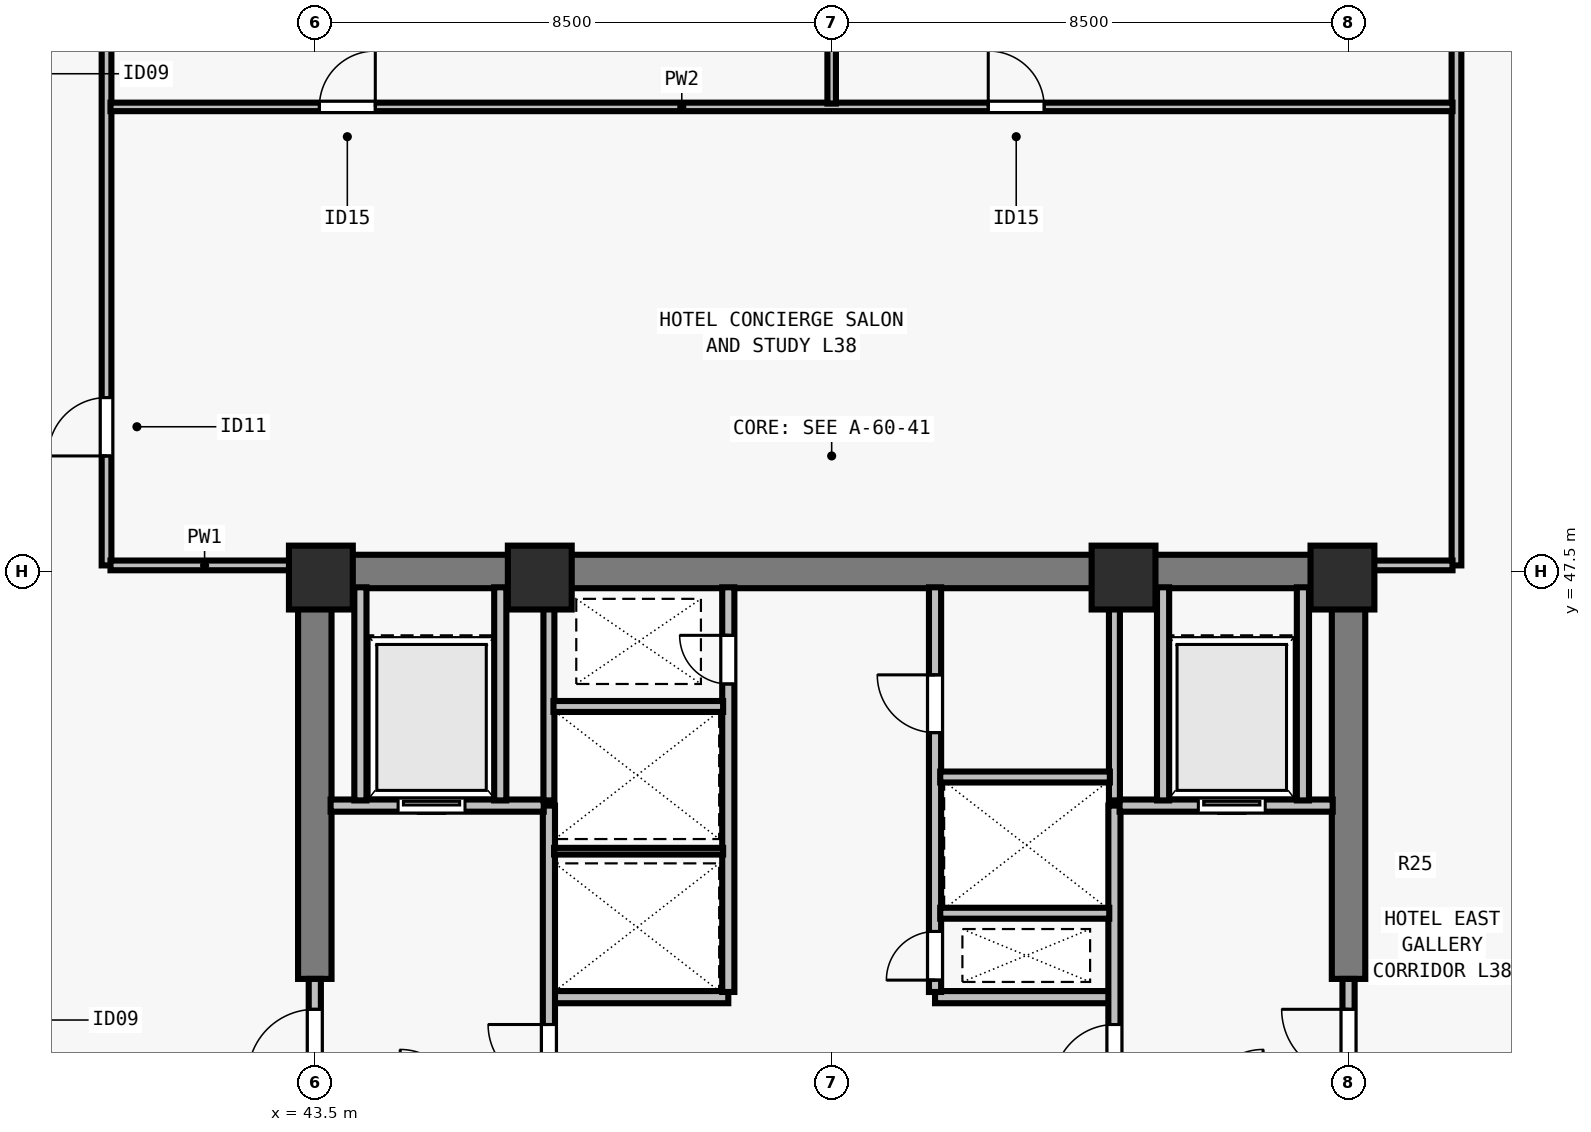
"""IFC4 building model, lengths in metres.
Left out: names, types, materials, properties, quantities, classifications, styles, units other than length and angle.
Written with IfcOpenShell. Run it as: python <this file> out.ifc"""

import sys

from ifc_helpers import new_model, si_unit, direction, frame, frame_2d, origin, origin_2d, place, context, subcontext, project, spatial, rectangle, extrude, element, fill, save


model = new_model("IFC4")
c1 = context("Model", 3, precision=1e-05, world=origin(), true_north=direction((0.0, 1.0)))
c2 = subcontext(c1, "Body", "Model", "MODEL_VIEW")
j1 = project(units=[si_unit("LENGTHUNIT", "METRE"), si_unit("PLANEANGLEUNIT", "RADIAN")], contexts=[c1])
p1 = place(None, origin())
s1 = spatial("IfcSite", under=j1, at=p1, CompositionType="ELEMENT")
p2 = place(p1, origin())
s2 = spatial("IfcBuilding", under=s1, at=p2, CompositionType="ELEMENT")
p3 = place(p2, frame((0.0, 0.0, 141.0)))
s3 = spatial("IfcBuildingStorey", under=s2, at=p3, CompositionType="ELEMENT", Elevation=141.0)
for number, where, z_axis, x_axis in (
    (1, (43.6, 47.4, 0.0), (0.0, 0.0, 1.0), (1.0, 0.0, 0.0)),
    (2, (47.2, 47.4, 0.0), (0.0, 0.0, 1.0), (1.0, 0.0, 0.0)),
    (3, (56.8, 47.4, 0.0), (0.0, 0.0, 1.0), (1.0, 0.0, 0.0)),
    (4, (60.4, 47.4, 0.0), (0.0, 0.0, 1.0), (1.0, 0.0, 0.0)),
):
    element("IfcColumn", number, at=place(p3, frame(where, z_axis=z_axis, x_axis=x_axis)), inside=s3, PredefinedType="COLUMN", context=c2, shape_type="SweptSolid", body=[
        extrude(rectangle(XDim=1.05, YDim=1.05, at=origin_2d()), origin(), (0.0, 0.0, 1.0), 3.5),
    ])
p4 = place(p3, frame((43.225, 47.5, 0.0), z_axis=(0.0, 0.0, 1.0), x_axis=(1.0, 0.0, 0.0)))
e5 = element("IfcWall", 5, at=p4, inside=s3, PredefinedType="SHEAR", context=c2, shape_type="SweptSolid", body=[
    extrude(rectangle(XDim=17.55, YDim=0.55, at=frame_2d((8.775, 0.0))), origin(), (0.0, 0.0, 1.0), 3.28),
])
for number, where, z_axis, x_axis in (
    (6, (43.5, 40.8, 0.0), (0.0, 0.0, 1.0), (0.0, 1.0, 0.0)),
    (7, (60.5, 40.8, 0.0), (0.0, 0.0, 1.0), (0.0, 1.0, 0.0)),
):
    element("IfcWall", number, at=place(p3, frame(where, z_axis=z_axis, x_axis=x_axis)), inside=s3, PredefinedType="SHEAR", context=c2, shape_type="SweptSolid", body=[
        extrude(rectangle(XDim=6.435, YDim=0.55, at=frame_2d((3.218, 0.0))), origin(), (0.0, 0.0, 1.0), 3.28),
    ])
for number, where, z_axis, x_axis in (
    (8, (47.35, 40.5, 0.0), (0.0, 0.0, 1.0), (1.0, 0.0, 0.0)),
    (9, (53.7, 40.5, 0.0), (0.0, 0.0, 1.0), (1.0, 0.0, 0.0)),
):
    element("IfcWall", number, at=place(p3, frame(where, z_axis=z_axis, x_axis=x_axis)), inside=s3, PredefinedType="SOLIDWALL", context=c2, shape_type="SweptSolid", body=[
        extrude(rectangle(XDim=2.95, YDim=0.2, at=frame_2d((1.475, 0.0))), origin(), (0.0, 0.0, 1.0), 3.28),
    ])
p5 = place(p3, frame((50.3, 40.585, 0.0), z_axis=(0.0, 0.0, 1.0), x_axis=(0.0, 1.0, 0.0)))
e10 = element("IfcWall", 10, at=p5, inside=s3, PredefinedType="SOLIDWALL", context=c2, shape_type="SweptSolid", body=[
    extrude(rectangle(XDim=6.655, YDim=0.2, at=frame_2d((3.328, 0.0))), origin(), (0.0, 0.0, 1.0), 3.28),
])
p6 = place(p5, frame((5.065, 0.0, 0.0)))
e11 = element("IfcOpeningElement", 11, at=p6, cuts=e10, PredefinedType="OPENING", context=c2, shape_type="SweptSolid", body=[
    extrude(rectangle(XDim=0.8, YDim=2.08, at=frame_2d((0.4, 1.04))), frame((0.0, 0.11, 0.0), z_axis=(0.0, -1.0, 0.0), x_axis=(1.0, 0.0, 0.0)), (0.0, 0.0, 1.0), 0.22),
])
p7 = place(p3, frame((53.7, 40.585, 0.0), z_axis=(0.0, 0.0, 1.0), x_axis=(0.0, 1.0, 0.0)))
e12 = element("IfcWall", 12, at=p7, inside=s3, PredefinedType="SOLIDWALL", context=c2, shape_type="SweptSolid", body=[
    extrude(rectangle(XDim=6.655, YDim=0.2, at=frame_2d((3.328, 0.0))), origin(), (0.0, 0.0, 1.0), 3.28),
])
p8 = place(p7, frame((0.195, 0.0, 0.0)))
e13 = element("IfcOpeningElement", 13, at=p8, cuts=e12, PredefinedType="OPENING", context=c2, shape_type="SweptSolid", body=[
    extrude(rectangle(XDim=0.8, YDim=2.08, at=frame_2d((0.4, 1.04))), frame((0.0, 0.11, 0.0), z_axis=(0.0, -1.0, 0.0), x_axis=(1.0, 0.0, 0.0)), (0.0, 0.0, 1.0), 0.22),
])
p9 = place(p7, frame((4.265, 0.0, 0.0)))
e14 = element("IfcOpeningElement", 14, at=p9, cuts=e12, PredefinedType="OPENING", context=c2, shape_type="SweptSolid", body=[
    extrude(rectangle(XDim=0.95, YDim=2.12, at=frame_2d((0.475, 1.06))), frame((0.0, 0.11, 0.0), z_axis=(0.0, -1.0, 0.0), x_axis=(1.0, 0.0, 0.0)), (0.0, 0.0, 1.0), 0.22),
])
p10 = place(p3, frame((43.5, 38.75, 0.0), z_axis=(0.0, 0.0, 1.0), x_axis=(0.0, 1.0, 0.0)))
e15 = element("IfcWall", 15, at=p10, inside=s3, PredefinedType="SOLIDWALL", context=c2, shape_type="SweptSolid", body=[
    extrude(rectangle(XDim=2.05, YDim=0.2, at=frame_2d((1.025, 0.0))), origin(), (0.0, 0.0, 1.0), 3.28),
])
p11 = place(p10, frame((0.45, 0.0, 0.0)))
e16 = element("IfcOpeningElement", 16, at=p11, cuts=e15, PredefinedType="OPENING", context=c2, shape_type="SweptSolid", body=[
    extrude(rectangle(XDim=1.1, YDim=2.15, at=frame_2d((0.55, 1.075))), frame((0.0, 0.11, 0.0), z_axis=(0.0, -1.0, 0.0), x_axis=(1.0, 0.0, 0.0)), (0.0, 0.0, 1.0), 0.22),
])
p12 = place(p3, frame((47.35, 38.785, 0.0), z_axis=(0.0, 0.0, 1.0), x_axis=(0.0, 1.0, 0.0)))
e17 = element("IfcWall", 17, at=p12, inside=s3, PredefinedType="SOLIDWALL", context=c2, shape_type="SweptSolid", body=[
    extrude(rectangle(XDim=4.865, YDim=0.2, at=frame_2d((2.433, 0.0))), origin(), (0.0, 0.0, 1.0), 3.28),
])
p13 = place(p12, frame((0.265, 0.0, 0.0)))
e18 = element("IfcOpeningElement", 18, at=p13, cuts=e17, PredefinedType="OPENING", context=c2, shape_type="SweptSolid", body=[
    extrude(rectangle(XDim=1.0, YDim=2.15, at=frame_2d((0.5, 1.075))), frame((0.0, 0.11, 0.0), z_axis=(0.0, -1.0, 0.0), x_axis=(1.0, 0.0, 0.0)), (0.0, 0.0, 1.0), 0.22),
])
p14 = place(p3, frame((43.76, 43.65, 0.0), z_axis=(0.0, 0.0, 1.0), x_axis=(1.0, 0.0, 0.0)))
e19 = element("IfcWall", 19, at=p14, inside=s3, PredefinedType="SOLIDWALL", context=c2, shape_type="SweptSolid", body=[
    extrude(rectangle(XDim=3.505, YDim=0.2, at=frame_2d((1.752, 0.0))), origin(), (0.0, 0.0, 1.0), 3.28),
])
p15 = place(p14, frame((1.11, 0.0, 0.0)))
e20 = element("IfcOpeningElement", 20, at=p15, cuts=e19, PredefinedType="OPENING", context=c2, shape_type="SweptSolid", body=[
    extrude(rectangle(XDim=1.1, YDim=2.2, at=frame_2d((0.55, 1.1))), frame((0.0, 0.11, 0.0), z_axis=(0.0, -1.0, 0.0), x_axis=(1.0, 0.0, 0.0)), (0.0, 0.0, 1.0), 0.22),
])
for number, where, z_axis, x_axis in (
    (21, (46.55, 43.735, 0.0), (0.0, 0.0, 1.0), (0.0, 1.0, 0.0)),
    (22, (44.25, 43.735, 0.0), (0.0, 0.0, 1.0), (0.0, 1.0, 0.0)),
):
    element("IfcWall", number, at=place(p3, frame(where, z_axis=z_axis, x_axis=x_axis)), inside=s3, PredefinedType="SOLIDWALL", context=c2, shape_type="SweptSolid", body=[
        extrude(rectangle(XDim=3.505, YDim=0.2, at=frame_2d((1.752, 0.0))), origin(), (0.0, 0.0, 1.0), 3.28),
    ])
p16 = place(p3, frame((60.5, 38.75, 0.0), z_axis=(0.0, 0.0, 1.0), x_axis=(0.0, 1.0, 0.0)))
e23 = element("IfcWall", 23, at=p16, inside=s3, PredefinedType="SOLIDWALL", context=c2, shape_type="SweptSolid", body=[
    extrude(rectangle(XDim=2.05, YDim=0.2, at=frame_2d((1.025, 0.0))), origin(), (0.0, 0.0, 1.0), 3.28),
])
p17 = place(p16, frame((0.45, 0.0, 0.0)))
e24 = element("IfcOpeningElement", 24, at=p17, cuts=e23, PredefinedType="OPENING", context=c2, shape_type="SweptSolid", body=[
    extrude(rectangle(XDim=1.1, YDim=2.15, at=frame_2d((0.55, 1.075))), frame((0.0, 0.11, 0.0), z_axis=(0.0, -1.0, 0.0), x_axis=(1.0, 0.0, 0.0)), (0.0, 0.0, 1.0), 0.22),
])
p18 = place(p3, frame((56.65, 38.785, 0.0), z_axis=(0.0, 0.0, 1.0), x_axis=(0.0, 1.0, 0.0)))
e25 = element("IfcWall", 25, at=p18, inside=s3, PredefinedType="SOLIDWALL", context=c2, shape_type="SweptSolid", body=[
    extrude(rectangle(XDim=4.865, YDim=0.2, at=frame_2d((2.433, 0.0))), origin(), (0.0, 0.0, 1.0), 3.28),
])
p19 = place(p18, frame((0.265, 0.0, 0.0)))
e26 = element("IfcOpeningElement", 26, at=p19, cuts=e25, PredefinedType="OPENING", context=c2, shape_type="SweptSolid", body=[
    extrude(rectangle(XDim=1.0, YDim=2.15, at=frame_2d((0.5, 1.075))), frame((0.0, 0.11, 0.0), z_axis=(0.0, -1.0, 0.0), x_axis=(1.0, 0.0, 0.0)), (0.0, 0.0, 1.0), 0.22),
])
p20 = place(p3, frame((56.735, 43.65, 0.0), z_axis=(0.0, 0.0, 1.0), x_axis=(1.0, 0.0, 0.0)))
e27 = element("IfcWall", 27, at=p20, inside=s3, PredefinedType="SOLIDWALL", context=c2, shape_type="SweptSolid", body=[
    extrude(rectangle(XDim=3.505, YDim=0.2, at=frame_2d((1.752, 0.0))), origin(), (0.0, 0.0, 1.0), 3.28),
])
p21 = place(p20, frame((1.295, 0.0, 0.0)))
e28 = element("IfcOpeningElement", 28, at=p21, cuts=e27, PredefinedType="OPENING", context=c2, shape_type="SweptSolid", body=[
    extrude(rectangle(XDim=1.1, YDim=2.2, at=frame_2d((0.55, 1.1))), frame((0.0, 0.11, 0.0), z_axis=(0.0, -1.0, 0.0), x_axis=(1.0, 0.0, 0.0)), (0.0, 0.0, 1.0), 0.22),
])
for number, where, z_axis, x_axis in (
    (29, (57.45, 43.735, 0.0), (0.0, 0.0, 1.0), (0.0, 1.0, 0.0)),
    (30, (59.75, 43.735, 0.0), (0.0, 0.0, 1.0), (0.0, 1.0, 0.0)),
):
    element("IfcWall", number, at=place(p3, frame(where, z_axis=z_axis, x_axis=x_axis)), inside=s3, PredefinedType="SOLIDWALL", context=c2, shape_type="SweptSolid", body=[
        extrude(rectangle(XDim=3.505, YDim=0.2, at=frame_2d((1.752, 0.0))), origin(), (0.0, 0.0, 1.0), 3.28),
    ])
p22 = place(p3, frame((47.35, 43.735, 0.0), z_axis=(0.0, 0.0, 1.0), x_axis=(0.0, 1.0, 0.0)))
e31 = element("IfcWall", 31, at=p22, inside=s3, PredefinedType="SOLIDWALL", context=c2, shape_type="SweptSolid", body=[
    extrude(rectangle(XDim=3.505, YDim=0.18, at=frame_2d((1.752, 0.0))), origin(), (0.0, 0.0, 1.0), 3.28),
])
p23 = place(p3, frame((47.435, 42.9, 0.0), z_axis=(0.0, 0.0, 1.0), x_axis=(1.0, 0.0, 0.0)))
e32 = element("IfcWall", 32, at=p23, inside=s3, PredefinedType="PARTITIONING", context=c2, shape_type="SweptSolid", body=[
    extrude(rectangle(XDim=2.78, YDim=0.11, at=frame_2d((1.39, 0.0))), origin(), (0.0, 0.0, 1.0), 3.28),
])
p24 = place(p3, frame((47.425, 45.28, 0.0), z_axis=(0.0, 0.0, 1.0), x_axis=(1.0, 0.0, 0.0)))
e33 = element("IfcWall", 33, at=p24, inside=s3, PredefinedType="SOLIDWALL", context=c2, shape_type="SweptSolid", body=[
    extrude(rectangle(XDim=2.79, YDim=0.18, at=frame_2d((1.395, 0.0))), origin(), (0.0, 0.0, 1.0), 3.28),
])
p25 = place(p3, frame((56.65, 43.735, 0.0), z_axis=(0.0, 0.0, 1.0), x_axis=(0.0, 1.0, 0.0)))
e34 = element("IfcWall", 34, at=p25, inside=s3, PredefinedType="SOLIDWALL", context=c2, shape_type="SweptSolid", body=[
    extrude(rectangle(XDim=3.505, YDim=0.18, at=frame_2d((1.752, 0.0))), origin(), (0.0, 0.0, 1.0), 3.28),
])
p26 = place(p3, frame((53.785, 41.88, 0.0), z_axis=(0.0, 0.0, 1.0), x_axis=(1.0, 0.0, 0.0)))
e35 = element("IfcWall", 35, at=p26, inside=s3, PredefinedType="SOLIDWALL", context=c2, shape_type="SweptSolid", body=[
    extrude(rectangle(XDim=2.78, YDim=0.18, at=frame_2d((1.39, 0.0))), origin(), (0.0, 0.0, 1.0), 3.28),
])
p27 = place(p3, frame((53.785, 44.12, 0.0), z_axis=(0.0, 0.0, 1.0), x_axis=(1.0, 0.0, 0.0)))
e36 = element("IfcWall", 36, at=p27, inside=s3, PredefinedType="SOLIDWALL", context=c2, shape_type="SweptSolid", body=[
    extrude(rectangle(XDim=2.79, YDim=0.18, at=frame_2d((1.395, 0.0))), origin(), (0.0, 0.0, 1.0), 3.28),
])
p28 = place(p3, frame((40.075, 47.6, 0.0), z_axis=(0.0, 0.0, 1.0), x_axis=(0.0, 1.0, 0.0)))
e37 = element("IfcWall", 37, at=p28, inside=s3, PredefinedType="PARTITIONING", context=c2, shape_type="SweptSolid", body=[
    extrude(rectangle(XDim=15.075, YDim=0.16, at=frame_2d((7.538, 0.0))), origin(), (0.0, 0.0, 1.0), 2.555),
])
p29 = place(p28, frame((1.8, 0.0, 0.0)))
e38 = element("IfcOpeningElement", 38, at=p29, cuts=e37, PredefinedType="OPENING", context=c2, shape_type="SweptSolid", body=[
    extrude(rectangle(XDim=0.96, YDim=2.12, at=frame_2d((0.48, 1.06))), frame((0.0, 0.09, 0.0), z_axis=(0.0, -1.0, 0.0), x_axis=(1.0, 0.0, 0.0)), (0.0, 0.0, 1.0), 0.18),
])
p30 = place(p3, frame((40.14, 47.6, 0.0), z_axis=(0.0, 0.0, 1.0), x_axis=(1.0, 0.0, 0.0)))
e39 = element("IfcWall", 39, at=p30, inside=s3, PredefinedType="PARTITIONING", context=c2, shape_type="SweptSolid", body=[
    extrude(rectangle(XDim=3.095, YDim=0.16, at=frame_2d((1.548, 0.0))), origin(), (0.0, 0.0, 1.0), 3.28),
])
p31 = place(p3, frame((62.275, 47.6, 0.0), z_axis=(0.0, 0.0, 1.0), x_axis=(0.0, 1.0, 0.0)))
e40 = element("IfcWall", 40, at=p31, inside=s3, PredefinedType="PARTITIONING", context=c2, shape_type="SweptSolid", body=[
    extrude(rectangle(XDim=15.075, YDim=0.16, at=frame_2d((7.538, 0.0))), origin(), (0.0, 0.0, 1.0), 2.555),
])
p32 = place(p3, frame((60.765, 47.6, 0.0), z_axis=(0.0, 0.0, 1.0), x_axis=(1.0, 0.0, 0.0)))
e41 = element("IfcWall", 41, at=p32, inside=s3, PredefinedType="PARTITIONING", context=c2, shape_type="SweptSolid", body=[
    extrude(rectangle(XDim=1.445, YDim=0.16, at=frame_2d((0.723, 0.0))), origin(), (0.0, 0.0, 1.0), 3.28),
])
p33 = place(p3, frame((40.14, 55.14, 0.0), z_axis=(0.0, 0.0, 1.0), x_axis=(1.0, 0.0, 0.0)))
e42 = element("IfcWall", 42, at=p33, inside=s3, PredefinedType="PARTITIONING", context=c2, shape_type="SweptSolid", body=[
    extrude(rectangle(XDim=22.07, YDim=0.14, at=frame_2d((11.035, 0.0))), origin(), (0.0, 0.0, 1.0), 3.28),
])
p34 = place(p33, frame((3.435, 0.0, 0.0)))
e43 = element("IfcOpeningElement", 43, at=p34, cuts=e42, PredefinedType="OPENING", context=c2, shape_type="SweptSolid", body=[
    extrude(rectangle(XDim=0.92, YDim=2.12, at=frame_2d((0.46, 1.06))), frame((0.0, 0.08, 0.0), z_axis=(0.0, -1.0, 0.0), x_axis=(1.0, 0.0, 0.0)), (0.0, 0.0, 1.0), 0.16),
])
p35 = place(p33, frame((14.435, 0.0, 0.0)))
e44 = element("IfcOpeningElement", 44, at=p35, cuts=e42, PredefinedType="OPENING", context=c2, shape_type="SweptSolid", body=[
    extrude(rectangle(XDim=0.92, YDim=2.12, at=frame_2d((0.46, 1.06))), frame((0.0, 0.08, 0.0), z_axis=(0.0, -1.0, 0.0), x_axis=(1.0, 0.0, 0.0)), (0.0, 0.0, 1.0), 0.16),
])
p36 = place(p3, frame((52.0, 55.195, 0.0), z_axis=(0.0, 0.0, 1.0), x_axis=(0.0, 1.0, 0.0)))
e45 = element("IfcWall", 45, at=p36, inside=s3, PredefinedType="PARTITIONING", context=c2, shape_type="SweptSolid", body=[
    extrude(rectangle(XDim=7.48, YDim=0.14, at=frame_2d((3.74, 0.0))), origin(), (0.0, 0.0, 1.0), 3.28),
])
p37 = place(p11, origin())
e46 = element("IfcDoor", 46, at=p37, inside=s3, OperationType="SINGLE_SWING_LEFT", PredefinedType="DOOR", context=c2, shape_type="SweptSolid", body=[
    extrude(rectangle(XDim=1.1, YDim=2.15, at=frame_2d((0.55, 1.075))), frame((0.0, 0.025, 0.0), z_axis=(0.0, -1.0, 0.0), x_axis=(1.0, 0.0, 0.0)), (0.0, 0.0, 1.0), 0.05),
])
fill(e16, e46)
p38 = place(p13, origin())
e47 = element("IfcDoor", 47, at=p38, inside=s3, OperationType="SINGLE_SWING_RIGHT", PredefinedType="DOOR", context=c2, shape_type="SweptSolid", body=[
    extrude(rectangle(XDim=1.0, YDim=2.15, at=frame_2d((0.5, 1.075))), frame((0.0, 0.025, 0.0), z_axis=(0.0, -1.0, 0.0), x_axis=(1.0, 0.0, 0.0)), (0.0, 0.0, 1.0), 0.05),
])
fill(e18, e47)
p39 = place(p15, origin())
e48 = element("IfcDoor", 48, at=p39, inside=s3, OperationType="SLIDING_TO_LEFT", PredefinedType="DOOR", context=c2, shape_type="SweptSolid", body=[
    extrude(rectangle(XDim=1.1, YDim=2.2, at=frame_2d((0.55, 1.1))), frame((0.0, 0.025, 0.0), z_axis=(0.0, -1.0, 0.0), x_axis=(1.0, 0.0, 0.0)), (0.0, 0.0, 1.0), 0.05),
])
fill(e20, e48)
p40 = place(p17, origin())
e49 = element("IfcDoor", 49, at=p40, inside=s3, OperationType="SINGLE_SWING_RIGHT", PredefinedType="DOOR", context=c2, shape_type="SweptSolid", body=[
    extrude(rectangle(XDim=1.1, YDim=2.15, at=frame_2d((0.55, 1.075))), frame((0.0, 0.025, 0.0), z_axis=(0.0, -1.0, 0.0), x_axis=(1.0, 0.0, 0.0)), (0.0, 0.0, 1.0), 0.05),
])
fill(e24, e49)
p41 = place(p19, origin())
e50 = element("IfcDoor", 50, at=p41, inside=s3, OperationType="SINGLE_SWING_LEFT", PredefinedType="DOOR", context=c2, shape_type="SweptSolid", body=[
    extrude(rectangle(XDim=1.0, YDim=2.15, at=frame_2d((0.5, 1.075))), frame((0.0, 0.025, 0.0), z_axis=(0.0, -1.0, 0.0), x_axis=(1.0, 0.0, 0.0)), (0.0, 0.0, 1.0), 0.05),
])
fill(e26, e50)
p42 = place(p21, origin())
e51 = element("IfcDoor", 51, at=p42, inside=s3, OperationType="SLIDING_TO_LEFT", PredefinedType="DOOR", context=c2, shape_type="SweptSolid", body=[
    extrude(rectangle(XDim=1.1, YDim=2.2, at=frame_2d((0.55, 1.1))), frame((0.0, 0.025, 0.0), z_axis=(0.0, -1.0, 0.0), x_axis=(1.0, 0.0, 0.0)), (0.0, 0.0, 1.0), 0.05),
])
fill(e28, e51)
p43 = place(p6, origin())
e52 = element("IfcDoor", 52, at=p43, inside=s3, OperationType="SINGLE_SWING_RIGHT", PredefinedType="DOOR", context=c2, shape_type="SweptSolid", body=[
    extrude(rectangle(XDim=0.8, YDim=2.08, at=frame_2d((0.4, 1.04))), frame((0.0, 0.025, 0.0), z_axis=(0.0, -1.0, 0.0), x_axis=(1.0, 0.0, 0.0)), (0.0, 0.0, 1.0), 0.05),
])
fill(e11, e52)
p44 = place(p8, origin())
e53 = element("IfcDoor", 53, at=p44, inside=s3, OperationType="SINGLE_SWING_LEFT", PredefinedType="DOOR", context=c2, shape_type="SweptSolid", body=[
    extrude(rectangle(XDim=0.8, YDim=2.08, at=frame_2d((0.4, 1.04))), frame((0.0, 0.025, 0.0), z_axis=(0.0, -1.0, 0.0), x_axis=(1.0, 0.0, 0.0)), (0.0, 0.0, 1.0), 0.05),
])
fill(e13, e53)
p45 = place(p9, origin())
e54 = element("IfcDoor", 54, at=p45, inside=s3, OperationType="SINGLE_SWING_RIGHT", PredefinedType="DOOR", context=c2, shape_type="SweptSolid", body=[
    extrude(rectangle(XDim=0.95, YDim=2.12, at=frame_2d((0.475, 1.06))), frame((0.0, 0.025, 0.0), z_axis=(0.0, -1.0, 0.0), x_axis=(1.0, 0.0, 0.0)), (0.0, 0.0, 1.0), 0.05),
])
fill(e14, e54)
p46 = place(p29, origin())
e55 = element("IfcDoor", 55, at=p46, inside=s3, OperationType="SINGLE_SWING_LEFT", PredefinedType="DOOR", context=c2, shape_type="SweptSolid", body=[
    extrude(rectangle(XDim=0.96, YDim=2.12, at=frame_2d((0.48, 1.06))), frame((0.0, 0.025, 0.0), z_axis=(0.0, -1.0, 0.0), x_axis=(1.0, 0.0, 0.0)), (0.0, 0.0, 1.0), 0.05),
])
fill(e38, e55)
p47 = place(p34, origin())
e56 = element("IfcDoor", 56, at=p47, inside=s3, OperationType="SINGLE_SWING_RIGHT", PredefinedType="DOOR", context=c2, shape_type="SweptSolid", body=[
    extrude(rectangle(XDim=0.92, YDim=2.12, at=frame_2d((0.46, 1.06))), frame((0.0, 0.025, 0.0), z_axis=(0.0, -1.0, 0.0), x_axis=(1.0, 0.0, 0.0)), (0.0, 0.0, 1.0), 0.05),
])
fill(e43, e56)
p48 = place(p35, origin())
e57 = element("IfcDoor", 57, at=p48, inside=s3, OperationType="SINGLE_SWING_LEFT", PredefinedType="DOOR", context=c2, shape_type="SweptSolid", body=[
    extrude(rectangle(XDim=0.92, YDim=2.12, at=frame_2d((0.46, 1.06))), frame((0.0, 0.025, 0.0), z_axis=(0.0, -1.0, 0.0), x_axis=(1.0, 0.0, 0.0)), (0.0, 0.0, 1.0), 0.05),
])
fill(e44, e57)
save(model, sys.argv[1])
